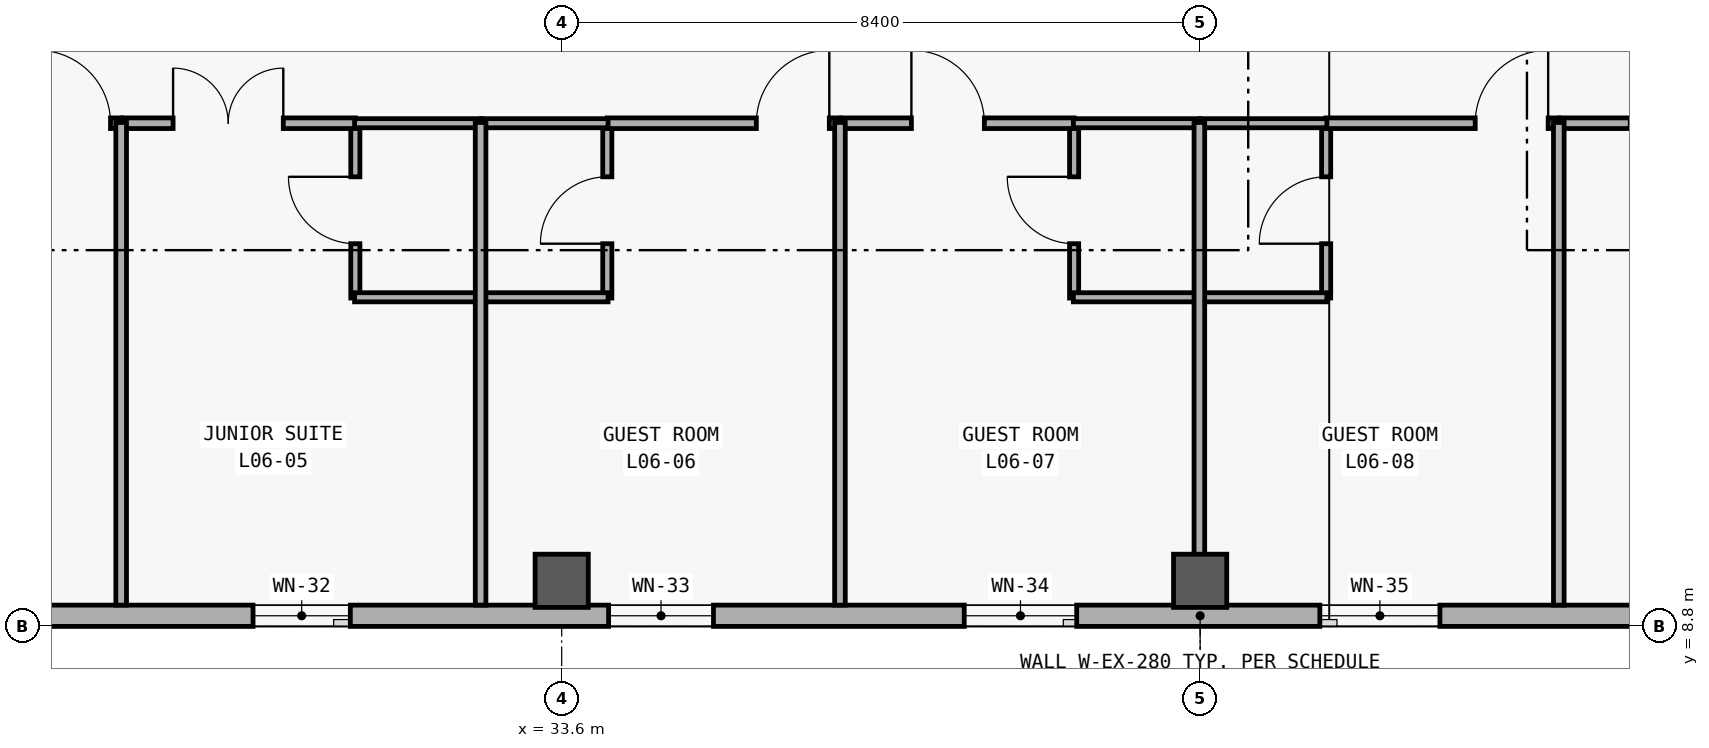
"""IFC4 building model, lengths in metres.
Left out: names, types, materials, properties, quantities, classifications, styles, units other than length and angle.
Written with IfcOpenShell. Run it as: python <this file> out.ifc"""

import sys

from ifc_helpers import new_model, si_unit, direction, frame, frame_2d, origin, origin_2d, place, context, subcontext, project, spatial, rectangle, extrude, element, fill, save


model = new_model("IFC4")
c1 = context("Model", 3, precision=1e-05, world=origin(), true_north=direction((0.0, 1.0)))
c2 = subcontext(c1, "Body", "Model", "MODEL_VIEW")
j1 = project(units=[si_unit("LENGTHUNIT", "METRE"), si_unit("PLANEANGLEUNIT", "RADIAN")], contexts=[c1])
p1 = place(None, origin())
s1 = spatial("IfcSite", under=j1, at=p1, CompositionType="ELEMENT")
p2 = place(p1, origin())
s2 = spatial("IfcBuilding", under=s1, at=p2, CompositionType="ELEMENT")
p3 = place(p2, frame((0.0, 0.0, 26.4)))
s3 = spatial("IfcBuildingStorey", under=s2, at=p3, CompositionType="ELEMENT", Elevation=26.4)
for number, where, z_axis, x_axis in (
    (1, (33.6, 9.4, 0.0), (0.0, 0.0, 1.0), (1.0, 0.0, 0.0)),
    (2, (42.0, 9.4, 0.0), (0.0, 0.0, 1.0), (1.0, 0.0, 0.0)),
):
    element("IfcColumn", number, at=place(p3, frame(where, z_axis=z_axis, x_axis=x_axis)), inside=s3, PredefinedType="COLUMN", context=c2, shape_type="SweptSolid", body=[
        extrude(rectangle(XDim=0.7, YDim=0.7, at=origin_2d()), origin(), (0.0, 0.0, 1.0), 3.6),
    ])
p4 = place(p3, frame((75.32, 8.94, 0.0), z_axis=(0.0, 0.0, 1.0), x_axis=(-1.0, 0.0, 0.0)))
e3 = element("IfcWall", 3, at=p4, inside=s3, PredefinedType="SOLIDWALL", context=c2, shape_type="SweptSolid", body=[
    extrude(rectangle(XDim=66.64, YDim=0.28, at=frame_2d((33.32, 0.0))), origin(), (0.0, 0.0, 1.0), 3.32),
])
p5 = place(p4, frame((62.905, 0.0, 0.85)))
e4 = element("IfcOpeningElement", 4, at=p5, cuts=e3, PredefinedType="OPENING", context=c2, shape_type="SweptSolid", body=[
    extrude(rectangle(XDim=2.3, YDim=2.05, at=frame_2d((1.15, 1.025))), frame((0.0, 0.15, 0.0), z_axis=(0.0, -1.0, 0.0), x_axis=(1.0, 0.0, 0.0)), (0.0, 0.0, 1.0), 0.3),
])
p6 = place(p4, frame((57.952, 0.0, 0.85)))
e5 = element("IfcOpeningElement", 5, at=p6, cuts=e3, PredefinedType="OPENING", context=c2, shape_type="SweptSolid", body=[
    extrude(rectangle(XDim=2.75, YDim=2.1, at=frame_2d((1.375, 1.05))), frame((0.0, 0.15, 0.0), z_axis=(0.0, -1.0, 0.0), x_axis=(1.0, 0.0, 0.0)), (0.0, 0.0, 1.0), 0.3),
])
p7 = place(p4, frame((52.948, 0.0, 0.85)))
e6 = element("IfcOpeningElement", 6, at=p7, cuts=e3, PredefinedType="OPENING", context=c2, shape_type="SweptSolid", body=[
    extrude(rectangle(XDim=3.3, YDim=2.15, at=frame_2d((1.65, 1.075))), frame((0.0, 0.15, 0.0), z_axis=(0.0, -1.0, 0.0), x_axis=(1.0, 0.0, 0.0)), (0.0, 0.0, 1.0), 0.3),
])
p8 = place(p4, frame((49.28, 0.0, 0.85)))
e7 = element("IfcOpeningElement", 7, at=p8, cuts=e3, PredefinedType="OPENING", context=c2, shape_type="SweptSolid", body=[
    extrude(rectangle(XDim=1.18, YDim=1.5, at=frame_2d((0.59, 0.75))), frame((0.0, 0.15, 0.0), z_axis=(0.0, -1.0, 0.0), x_axis=(1.0, 0.0, 0.0)), (0.0, 0.0, 1.0), 0.3),
])
p9 = place(p4, frame((44.501, 0.0, 0.85)))
e8 = element("IfcOpeningElement", 8, at=p9, cuts=e3, PredefinedType="OPENING", context=c2, shape_type="SweptSolid", body=[
    extrude(rectangle(XDim=1.28, YDim=1.6, at=frame_2d((0.64, 0.8))), frame((0.0, 0.15, 0.0), z_axis=(0.0, -1.0, 0.0), x_axis=(1.0, 0.0, 0.0)), (0.0, 0.0, 1.0), 0.3),
])
p10 = place(p4, frame((39.723, 0.0, 0.85)))
e9 = element("IfcOpeningElement", 9, at=p10, cuts=e3, PredefinedType="OPENING", context=c2, shape_type="SweptSolid", body=[
    extrude(rectangle(XDim=1.38, YDim=1.7, at=frame_2d((0.69, 0.85))), frame((0.0, 0.15, 0.0), z_axis=(0.0, -1.0, 0.0), x_axis=(1.0, 0.0, 0.0)), (0.0, 0.0, 1.0), 0.3),
])
p11 = place(p4, frame((34.944, 0.0, 0.85)))
e10 = element("IfcOpeningElement", 10, at=p11, cuts=e3, PredefinedType="OPENING", context=c2, shape_type="SweptSolid", body=[
    extrude(rectangle(XDim=1.48, YDim=1.8, at=frame_2d((0.74, 0.9))), frame((0.0, 0.15, 0.0), z_axis=(0.0, -1.0, 0.0), x_axis=(1.0, 0.0, 0.0)), (0.0, 0.0, 1.0), 0.3),
])
p12 = place(p4, frame((30.165, 0.0, 0.85)))
e11 = element("IfcOpeningElement", 11, at=p12, cuts=e3, PredefinedType="OPENING", context=c2, shape_type="SweptSolid", body=[
    extrude(rectangle(XDim=1.58, YDim=1.85, at=frame_2d((0.79, 0.925))), frame((0.0, 0.15, 0.0), z_axis=(0.0, -1.0, 0.0), x_axis=(1.0, 0.0, 0.0)), (0.0, 0.0, 1.0), 0.3),
])
p13 = place(p4, frame((25.387, 0.0, 0.85)))
e12 = element("IfcOpeningElement", 12, at=p13, cuts=e3, PredefinedType="OPENING", context=c2, shape_type="SweptSolid", body=[
    extrude(rectangle(XDim=1.68, YDim=1.9, at=frame_2d((0.84, 0.95))), frame((0.0, 0.15, 0.0), z_axis=(0.0, -1.0, 0.0), x_axis=(1.0, 0.0, 0.0)), (0.0, 0.0, 1.0), 0.3),
])
p14 = place(p4, frame((20.608, 0.0, 0.85)))
e13 = element("IfcOpeningElement", 13, at=p14, cuts=e3, PredefinedType="OPENING", context=c2, shape_type="SweptSolid", body=[
    extrude(rectangle(XDim=1.78, YDim=1.95, at=frame_2d((0.89, 0.975))), frame((0.0, 0.15, 0.0), z_axis=(0.0, -1.0, 0.0), x_axis=(1.0, 0.0, 0.0)), (0.0, 0.0, 1.0), 0.3),
])
p15 = place(p4, frame((15.83, 0.0, 0.85)))
e14 = element("IfcOpeningElement", 14, at=p15, cuts=e3, PredefinedType="OPENING", context=c2, shape_type="SweptSolid", body=[
    extrude(rectangle(XDim=1.88, YDim=1.95, at=frame_2d((0.94, 0.975))), frame((0.0, 0.15, 0.0), z_axis=(0.0, -1.0, 0.0), x_axis=(1.0, 0.0, 0.0)), (0.0, 0.0, 1.0), 0.3),
])
p16 = place(p4, frame((11.016, 0.0, 0.85)))
e15 = element("IfcOpeningElement", 15, at=p16, cuts=e3, PredefinedType="OPENING", context=c2, shape_type="SweptSolid", body=[
    extrude(rectangle(XDim=2.05, YDim=1.95, at=frame_2d((1.025, 0.975))), frame((0.0, 0.15, 0.0), z_axis=(0.0, -1.0, 0.0), x_axis=(1.0, 0.0, 0.0)), (0.0, 0.0, 1.0), 0.3),
])
p17 = place(p4, frame((6.223, 0.0, 0.85)))
e16 = element("IfcOpeningElement", 16, at=p17, cuts=e3, PredefinedType="OPENING", context=c2, shape_type="SweptSolid", body=[
    extrude(rectangle(XDim=2.18, YDim=1.95, at=frame_2d((1.09, 0.975))), frame((0.0, 0.15, 0.0), z_axis=(0.0, -1.0, 0.0), x_axis=(1.0, 0.0, 0.0)), (0.0, 0.0, 1.0), 0.3),
])
p18 = place(p4, frame((1.394, 0.0, 0.85)))
e17 = element("IfcOpeningElement", 17, at=p18, cuts=e3, PredefinedType="OPENING", context=c2, shape_type="SweptSolid", body=[
    extrude(rectangle(XDim=2.38, YDim=1.95, at=frame_2d((1.19, 0.975))), frame((0.0, 0.15, 0.0), z_axis=(0.0, -1.0, 0.0), x_axis=(1.0, 0.0, 0.0)), (0.0, 0.0, 1.0), 0.3),
])
p19 = place(p3, frame((30.885, 13.12, 0.0), z_axis=(0.0, 0.0, 1.0), x_axis=(0.0, 1.0, 0.0)))
e18 = element("IfcWall", 18, at=p19, inside=s3, PredefinedType="PARTITIONING", context=c2, shape_type="SweptSolid", body=[
    extrude(rectangle(XDim=2.31, YDim=0.12, at=frame_2d((1.155, 0.0))), origin(), (0.0, 0.0, 1.0), 2.48),
])
p20 = place(p19, frame((0.715, 0.0, 0.0)))
e19 = element("IfcOpeningElement", 19, at=p20, cuts=e18, PredefinedType="OPENING", context=c2, shape_type="SweptSolid", body=[
    extrude(rectangle(XDim=0.88, YDim=2.15, at=frame_2d((0.44, 1.075))), frame((0.0, 0.07, 0.0), z_axis=(0.0, -1.0, 0.0), x_axis=(1.0, 0.0, 0.0)), (0.0, 0.0, 1.0), 0.14),
])
p21 = place(p3, frame((34.2, 13.12, 0.0), z_axis=(0.0, 0.0, 1.0), x_axis=(0.0, 1.0, 0.0)))
e20 = element("IfcWall", 20, at=p21, inside=s3, PredefinedType="PARTITIONING", context=c2, shape_type="SweptSolid", body=[
    extrude(rectangle(XDim=2.31, YDim=0.12, at=frame_2d((1.155, 0.0))), origin(), (0.0, 0.0, 1.0), 2.48),
])
p22 = place(p21, frame((0.715, 0.0, 0.0)))
e21 = element("IfcOpeningElement", 21, at=p22, cuts=e20, PredefinedType="OPENING", context=c2, shape_type="SweptSolid", body=[
    extrude(rectangle(XDim=0.88, YDim=2.15, at=frame_2d((0.44, 1.075))), frame((0.0, 0.07, 0.0), z_axis=(0.0, -1.0, 0.0), x_axis=(1.0, 0.0, 0.0)), (0.0, 0.0, 1.0), 0.14),
])
p23 = place(p3, frame((40.342, 13.12, 0.0), z_axis=(0.0, 0.0, 1.0), x_axis=(0.0, 1.0, 0.0)))
e22 = element("IfcWall", 22, at=p23, inside=s3, PredefinedType="PARTITIONING", context=c2, shape_type="SweptSolid", body=[
    extrude(rectangle(XDim=2.31, YDim=0.12, at=frame_2d((1.155, 0.0))), origin(), (0.0, 0.0, 1.0), 2.48),
])
p24 = place(p23, frame((0.715, 0.0, 0.0)))
e23 = element("IfcOpeningElement", 23, at=p24, cuts=e22, PredefinedType="OPENING", context=c2, shape_type="SweptSolid", body=[
    extrude(rectangle(XDim=0.88, YDim=2.15, at=frame_2d((0.44, 1.075))), frame((0.0, 0.07, 0.0), z_axis=(0.0, -1.0, 0.0), x_axis=(1.0, 0.0, 0.0)), (0.0, 0.0, 1.0), 0.14),
])
p25 = place(p3, frame((43.658, 13.12, 0.0), z_axis=(0.0, 0.0, 1.0), x_axis=(0.0, 1.0, 0.0)))
e24 = element("IfcWall", 24, at=p25, inside=s3, PredefinedType="PARTITIONING", context=c2, shape_type="SweptSolid", body=[
    extrude(rectangle(XDim=2.31, YDim=0.12, at=frame_2d((1.155, 0.0))), origin(), (0.0, 0.0, 1.0), 2.48),
])
p26 = place(p25, frame((0.715, 0.0, 0.0)))
e25 = element("IfcOpeningElement", 25, at=p26, cuts=e24, PredefinedType="OPENING", context=c2, shape_type="SweptSolid", body=[
    extrude(rectangle(XDim=0.88, YDim=2.15, at=frame_2d((0.44, 1.075))), frame((0.0, 0.07, 0.0), z_axis=(0.0, -1.0, 0.0), x_axis=(1.0, 0.0, 0.0)), (0.0, 0.0, 1.0), 0.14),
])
p27 = place(p3, frame((24.743, 15.42, 0.0), z_axis=(0.0, 0.0, 1.0), x_axis=(1.0, 0.0, 0.0)))
e26 = element("IfcWall", 26, at=p27, inside=s3, PredefinedType="PARTITIONING", context=c2, shape_type="SweptSolid", body=[
    extrude(rectangle(XDim=3.061, YDim=0.14, at=frame_2d((1.531, 0.0))), origin(), (0.0, 0.0, 1.0), 2.48),
])
p28 = place(p27, frame((1.961, 0.0, 0.0)))
e27 = element("IfcOpeningElement", 27, at=p28, cuts=e26, PredefinedType="OPENING", context=c2, shape_type="SweptSolid", body=[
    extrude(rectangle(XDim=0.96, YDim=2.25, at=frame_2d((0.48, 1.125))), frame((0.0, 0.08, 0.0), z_axis=(0.0, -1.0, 0.0), x_axis=(1.0, 0.0, 0.0)), (0.0, 0.0, 1.0), 0.16),
])
p29 = place(p3, frame((27.824, 15.42, 0.0), z_axis=(0.0, 0.0, 1.0), x_axis=(1.0, 0.0, 0.0)))
e28 = element("IfcWall", 28, at=p29, inside=s3, PredefinedType="PARTITIONING", context=c2, shape_type="SweptSolid", body=[
    extrude(rectangle(XDim=3.061, YDim=0.14, at=frame_2d((1.531, 0.0))), origin(), (0.0, 0.0, 1.0), 2.48),
])
p30 = place(p29, frame((0.663, 0.0, 0.0)))
e29 = element("IfcOpeningElement", 29, at=p30, cuts=e28, PredefinedType="OPENING", context=c2, shape_type="SweptSolid", body=[
    extrude(rectangle(XDim=1.45, YDim=2.3, at=frame_2d((0.725, 1.15))), frame((0.0, 0.08, 0.0), z_axis=(0.0, -1.0, 0.0), x_axis=(1.0, 0.0, 0.0)), (0.0, 0.0, 1.0), 0.16),
])
p31 = place(p3, frame((34.2, 15.42, 0.0), z_axis=(0.0, 0.0, 1.0), x_axis=(1.0, 0.0, 0.0)))
e30 = element("IfcWall", 30, at=p31, inside=s3, PredefinedType="PARTITIONING", context=c2, shape_type="SweptSolid", body=[
    extrude(rectangle(XDim=3.061, YDim=0.14, at=frame_2d((1.531, 0.0))), origin(), (0.0, 0.0, 1.0), 2.48),
])
p32 = place(p31, frame((1.961, 0.0, 0.0)))
e31 = element("IfcOpeningElement", 31, at=p32, cuts=e30, PredefinedType="OPENING", context=c2, shape_type="SweptSolid", body=[
    extrude(rectangle(XDim=0.96, YDim=2.25, at=frame_2d((0.48, 1.125))), frame((0.0, 0.08, 0.0), z_axis=(0.0, -1.0, 0.0), x_axis=(1.0, 0.0, 0.0)), (0.0, 0.0, 1.0), 0.16),
])
p33 = place(p3, frame((37.281, 15.42, 0.0), z_axis=(0.0, 0.0, 1.0), x_axis=(1.0, 0.0, 0.0)))
e32 = element("IfcWall", 32, at=p33, inside=s3, PredefinedType="PARTITIONING", context=c2, shape_type="SweptSolid", body=[
    extrude(rectangle(XDim=3.061, YDim=0.14, at=frame_2d((1.531, 0.0))), origin(), (0.0, 0.0, 1.0), 2.48),
])
p34 = place(p33, frame((0.92, 0.0, 0.0)))
e33 = element("IfcOpeningElement", 33, at=p34, cuts=e32, PredefinedType="OPENING", context=c2, shape_type="SweptSolid", body=[
    extrude(rectangle(XDim=0.96, YDim=2.25, at=frame_2d((0.48, 1.125))), frame((0.0, 0.08, 0.0), z_axis=(0.0, -1.0, 0.0), x_axis=(1.0, 0.0, 0.0)), (0.0, 0.0, 1.0), 0.16),
])
p35 = place(p3, frame((43.658, 15.42, 0.0), z_axis=(0.0, 0.0, 1.0), x_axis=(1.0, 0.0, 0.0)))
e34 = element("IfcWall", 34, at=p35, inside=s3, PredefinedType="PARTITIONING", context=c2, shape_type="SweptSolid", body=[
    extrude(rectangle(XDim=3.061, YDim=0.14, at=frame_2d((1.531, 0.0))), origin(), (0.0, 0.0, 1.0), 2.48),
])
p36 = place(p35, frame((1.961, 0.0, 0.0)))
e35 = element("IfcOpeningElement", 35, at=p36, cuts=e34, PredefinedType="OPENING", context=c2, shape_type="SweptSolid", body=[
    extrude(rectangle(XDim=0.96, YDim=2.25, at=frame_2d((0.48, 1.125))), frame((0.0, 0.08, 0.0), z_axis=(0.0, -1.0, 0.0), x_axis=(1.0, 0.0, 0.0)), (0.0, 0.0, 1.0), 0.16),
])
p37 = place(p3, frame((46.739, 15.42, 0.0), z_axis=(0.0, 0.0, 1.0), x_axis=(1.0, 0.0, 0.0)))
e36 = element("IfcWall", 36, at=p37, inside=s3, PredefinedType="PARTITIONING", context=c2, shape_type="SweptSolid", body=[
    extrude(rectangle(XDim=3.061, YDim=0.14, at=frame_2d((1.531, 0.0))), origin(), (0.0, 0.0, 1.0), 2.48),
])
p38 = place(p37, frame((0.92, 0.0, 0.0)))
e37 = element("IfcOpeningElement", 37, at=p38, cuts=e36, PredefinedType="OPENING", context=c2, shape_type="SweptSolid", body=[
    extrude(rectangle(XDim=0.96, YDim=2.25, at=frame_2d((0.48, 1.125))), frame((0.0, 0.08, 0.0), z_axis=(0.0, -1.0, 0.0), x_axis=(1.0, 0.0, 0.0)), (0.0, 0.0, 1.0), 0.16),
])
for number, where, z_axis, x_axis in (
    (38, (30.875, 13.13, 0.0), (0.0, 0.0, 1.0), (1.0, 0.0, 0.0)),
    (39, (30.875, 15.42, 0.0), (0.0, 0.0, 1.0), (1.0, 0.0, 0.0)),
):
    element("IfcWall", number, at=place(p3, frame(where, z_axis=z_axis, x_axis=x_axis)), inside=s3, PredefinedType="PARTITIONING", context=c2, shape_type="SweptSolid", body=[
        extrude(rectangle(XDim=1.668, YDim=0.12, at=frame_2d((0.834, 0.0))), origin(), (0.0, 0.0, 1.0), 2.48),
    ])
for number, where, z_axis, x_axis in (
    (40, (32.543, 13.13, 0.0), (0.0, 0.0, 1.0), (1.0, 0.0, 0.0)),
    (41, (32.543, 15.42, 0.0), (0.0, 0.0, 1.0), (1.0, 0.0, 0.0)),
):
    element("IfcWall", number, at=place(p3, frame(where, z_axis=z_axis, x_axis=x_axis)), inside=s3, PredefinedType="PARTITIONING", context=c2, shape_type="SweptSolid", body=[
        extrude(rectangle(XDim=1.667, YDim=0.12, at=frame_2d((0.833, 0.0))), origin(), (0.0, 0.0, 1.0), 2.48),
    ])
for number, where, z_axis, x_axis in (
    (42, (40.332, 13.13, 0.0), (0.0, 0.0, 1.0), (1.0, 0.0, 0.0)),
    (43, (40.332, 15.42, 0.0), (0.0, 0.0, 1.0), (1.0, 0.0, 0.0)),
    (44, (42.0, 13.13, 0.0), (0.0, 0.0, 1.0), (1.0, 0.0, 0.0)),
    (45, (42.0, 15.42, 0.0), (0.0, 0.0, 1.0), (1.0, 0.0, 0.0)),
):
    element("IfcWall", number, at=place(p3, frame(where, z_axis=z_axis, x_axis=x_axis)), inside=s3, PredefinedType="PARTITIONING", context=c2, shape_type="SweptSolid", body=[
        extrude(rectangle(XDim=1.668, YDim=0.12, at=frame_2d((0.834, 0.0))), origin(), (0.0, 0.0, 1.0), 2.48),
    ])
for number, where, z_axis, x_axis in (
    (46, (27.804, 9.08, 0.0), (0.0, 0.0, 1.0), (0.0, 1.0, 0.0)),
    (47, (32.533, 9.08, 0.0), (0.0, 0.0, 1.0), (0.0, 1.0, 0.0)),
    (48, (37.261, 9.08, 0.0), (0.0, 0.0, 1.0), (0.0, 1.0, 0.0)),
    (49, (41.99, 9.08, 0.0), (0.0, 0.0, 1.0), (0.0, 1.0, 0.0)),
    (50, (46.719, 9.08, 0.0), (0.0, 0.0, 1.0), (0.0, 1.0, 0.0)),
):
    element("IfcWall", number, at=place(p3, frame(where, z_axis=z_axis, x_axis=x_axis)), inside=s3, PredefinedType="PARTITIONING", context=c2, shape_type="SweptSolid", body=[
        extrude(rectangle(XDim=6.35, YDim=0.14, at=frame_2d((3.175, 0.0))), origin(), (0.0, 0.0, 1.0), 2.48),
    ])
p39 = place(p9, origin())
e51 = element("IfcWindow", 51, at=p39, inside=s3, PartitioningType="SINGLE_PANEL", PredefinedType="WINDOW", context=c2, shape_type="SweptSolid", body=[
    extrude(rectangle(XDim=1.28, YDim=1.6, at=frame_2d((0.64, 0.8))), frame((0.0, 0.03, 0.0), z_axis=(0.0, -1.0, 0.0), x_axis=(1.0, 0.0, 0.0)), (0.0, 0.0, 1.0), 0.06),
])
fill(e8, e51)
p40 = place(p10, origin())
e52 = element("IfcWindow", 52, at=p40, inside=s3, PartitioningType="SINGLE_PANEL", PredefinedType="WINDOW", context=c2, shape_type="SweptSolid", body=[
    extrude(rectangle(XDim=1.38, YDim=1.7, at=frame_2d((0.69, 0.85))), frame((0.0, 0.03, 0.0), z_axis=(0.0, -1.0, 0.0), x_axis=(1.0, 0.0, 0.0)), (0.0, 0.0, 1.0), 0.06),
])
fill(e9, e52)
p41 = place(p11, origin())
e53 = element("IfcWindow", 53, at=p41, inside=s3, PartitioningType="SINGLE_PANEL", PredefinedType="WINDOW", context=c2, shape_type="SweptSolid", body=[
    extrude(rectangle(XDim=1.48, YDim=1.8, at=frame_2d((0.74, 0.9))), frame((0.0, 0.03, 0.0), z_axis=(0.0, -1.0, 0.0), x_axis=(1.0, 0.0, 0.0)), (0.0, 0.0, 1.0), 0.06),
])
fill(e10, e53)
p42 = place(p12, origin())
e54 = element("IfcWindow", 54, at=p42, inside=s3, PartitioningType="SINGLE_PANEL", PredefinedType="WINDOW", context=c2, shape_type="SweptSolid", body=[
    extrude(rectangle(XDim=1.58, YDim=1.85, at=frame_2d((0.79, 0.925))), frame((0.0, 0.03, 0.0), z_axis=(0.0, -1.0, 0.0), x_axis=(1.0, 0.0, 0.0)), (0.0, 0.0, 1.0), 0.06),
])
fill(e11, e54)
p43 = place(p20, origin())
e55 = element("IfcDoor", 55, at=p43, inside=s3, OperationType="SINGLE_SWING_RIGHT", PredefinedType="DOOR", context=c2, shape_type="SweptSolid", body=[
    extrude(rectangle(XDim=0.88, YDim=2.15, at=frame_2d((0.44, 1.075))), frame((0.0, 0.025, 0.0), z_axis=(0.0, -1.0, 0.0), x_axis=(1.0, 0.0, 0.0)), (0.0, 0.0, 1.0), 0.05),
])
fill(e19, e55)
p44 = place(p22, origin())
e56 = element("IfcDoor", 56, at=p44, inside=s3, OperationType="SINGLE_SWING_LEFT", PredefinedType="DOOR", context=c2, shape_type="SweptSolid", body=[
    extrude(rectangle(XDim=0.88, YDim=2.15, at=frame_2d((0.44, 1.075))), frame((0.0, 0.025, 0.0), z_axis=(0.0, -1.0, 0.0), x_axis=(1.0, 0.0, 0.0)), (0.0, 0.0, 1.0), 0.05),
])
fill(e21, e56)
p45 = place(p24, origin())
e57 = element("IfcDoor", 57, at=p45, inside=s3, OperationType="SINGLE_SWING_RIGHT", PredefinedType="DOOR", context=c2, shape_type="SweptSolid", body=[
    extrude(rectangle(XDim=0.88, YDim=2.15, at=frame_2d((0.44, 1.075))), frame((0.0, 0.025, 0.0), z_axis=(0.0, -1.0, 0.0), x_axis=(1.0, 0.0, 0.0)), (0.0, 0.0, 1.0), 0.05),
])
fill(e23, e57)
p46 = place(p26, origin())
e58 = element("IfcDoor", 58, at=p46, inside=s3, OperationType="SINGLE_SWING_LEFT", PredefinedType="DOOR", context=c2, shape_type="SweptSolid", body=[
    extrude(rectangle(XDim=0.88, YDim=2.15, at=frame_2d((0.44, 1.075))), frame((0.0, 0.025, 0.0), z_axis=(0.0, -1.0, 0.0), x_axis=(1.0, 0.0, 0.0)), (0.0, 0.0, 1.0), 0.05),
])
fill(e25, e58)
p47 = place(p28, origin())
e59 = element("IfcDoor", 59, at=p47, inside=s3, OperationType="SINGLE_SWING_LEFT", PredefinedType="DOOR", context=c2, shape_type="SweptSolid", body=[
    extrude(rectangle(XDim=0.96, YDim=2.25, at=frame_2d((0.48, 1.125))), frame((0.0, 0.025, 0.0), z_axis=(0.0, -1.0, 0.0), x_axis=(1.0, 0.0, 0.0)), (0.0, 0.0, 1.0), 0.05),
])
fill(e27, e59)
p48 = place(p30, origin())
e60 = element("IfcDoor", 60, at=p48, inside=s3, OperationType="DOUBLE_DOOR_SINGLE_SWING", PredefinedType="DOOR", context=c2, shape_type="SweptSolid", body=[
    extrude(rectangle(XDim=1.45, YDim=2.3, at=frame_2d((0.725, 1.15))), frame((0.0, 0.025, 0.0), z_axis=(0.0, -1.0, 0.0), x_axis=(1.0, 0.0, 0.0)), (0.0, 0.0, 1.0), 0.05),
])
fill(e29, e60)
p49 = place(p32, origin())
e61 = element("IfcDoor", 61, at=p49, inside=s3, OperationType="SINGLE_SWING_RIGHT", PredefinedType="DOOR", context=c2, shape_type="SweptSolid", body=[
    extrude(rectangle(XDim=0.96, YDim=2.25, at=frame_2d((0.48, 1.125))), frame((0.0, 0.025, 0.0), z_axis=(0.0, -1.0, 0.0), x_axis=(1.0, 0.0, 0.0)), (0.0, 0.0, 1.0), 0.05),
])
fill(e31, e61)
p50 = place(p34, origin())
e62 = element("IfcDoor", 62, at=p50, inside=s3, OperationType="SINGLE_SWING_LEFT", PredefinedType="DOOR", context=c2, shape_type="SweptSolid", body=[
    extrude(rectangle(XDim=0.96, YDim=2.25, at=frame_2d((0.48, 1.125))), frame((0.0, 0.025, 0.0), z_axis=(0.0, -1.0, 0.0), x_axis=(1.0, 0.0, 0.0)), (0.0, 0.0, 1.0), 0.05),
])
fill(e33, e62)
p51 = place(p36, origin())
e63 = element("IfcDoor", 63, at=p51, inside=s3, OperationType="SINGLE_SWING_RIGHT", PredefinedType="DOOR", context=c2, shape_type="SweptSolid", body=[
    extrude(rectangle(XDim=0.96, YDim=2.25, at=frame_2d((0.48, 1.125))), frame((0.0, 0.025, 0.0), z_axis=(0.0, -1.0, 0.0), x_axis=(1.0, 0.0, 0.0)), (0.0, 0.0, 1.0), 0.05),
])
fill(e35, e63)
save(model, sys.argv[1])
